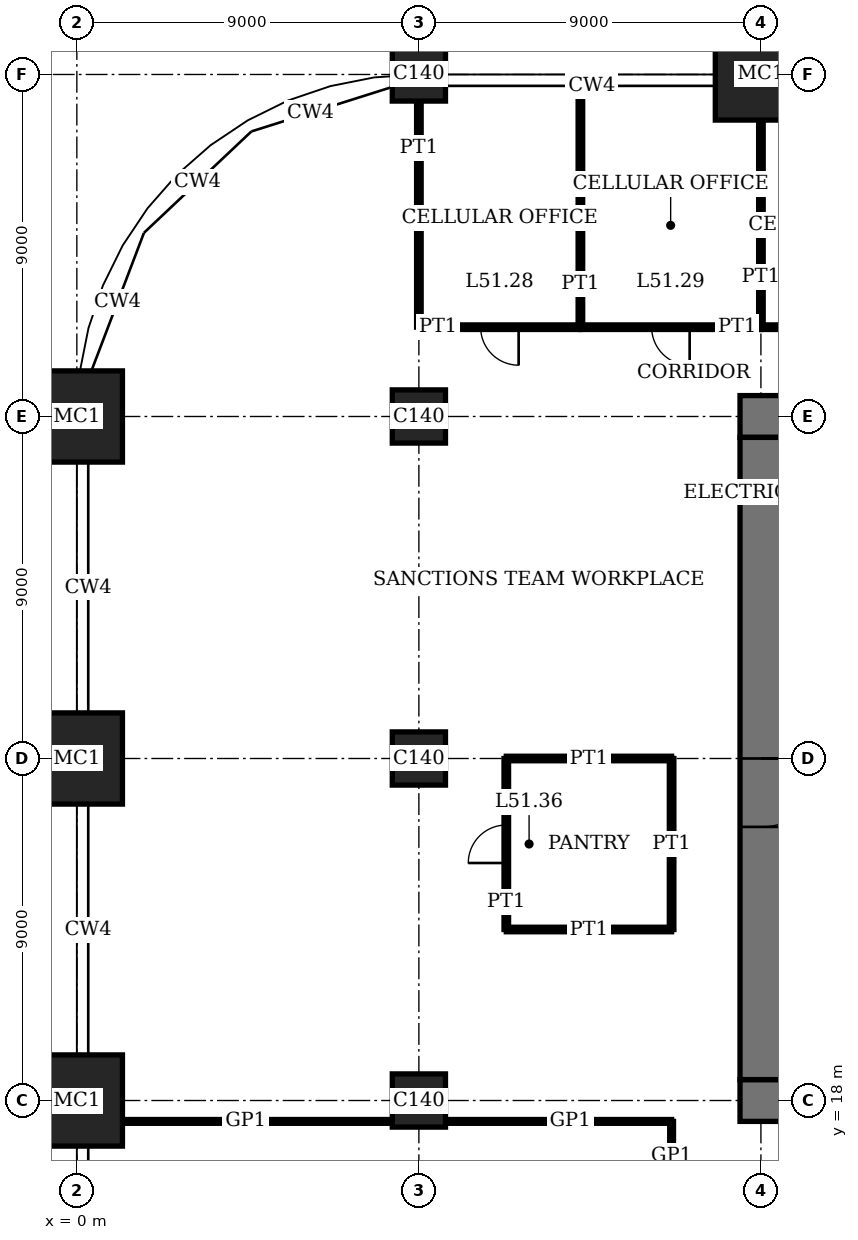
"""IFC4 building model, lengths in metres.
Left out: names, types, materials, properties, quantities, classifications, styles, units other than length and angle.
Written with IfcOpenShell. Run it as: python <this file> out.ifc"""

import sys

from ifc_helpers import new_model, si_unit, direction, frame, frame_2d, origin, origin_2d, place, context, subcontext, project, spatial, rectangle, extrude, element, fill, save


model = new_model("IFC4")
c1 = context("Model", 3, precision=1e-05, world=origin(), true_north=direction((0.0, 1.0)))
c2 = subcontext(c1, "Body", "Model", "MODEL_VIEW")
j1 = project(units=[si_unit("LENGTHUNIT", "METRE"), si_unit("PLANEANGLEUNIT", "RADIAN")], contexts=[c1])
p1 = place(None, origin())
s1 = spatial("IfcSite", under=j1, at=p1, CompositionType="ELEMENT")
p2 = place(p1, origin())
s2 = spatial("IfcBuilding", under=s1, at=p2, CompositionType="ELEMENT")
p3 = place(p2, frame((0.0, 0.0, 210.2)))
s3 = spatial("IfcBuildingStorey", under=s2, at=p3, CompositionType="ELEMENT", Elevation=210.2)
for number, where, z_axis, x_axis in (
    (1, (0.0, 18.0, 0.0), (0.0, 0.0, 1.0), (1.0, 0.0, 0.0)),
    (2, (0.0, 27.0, 0.0), (0.0, 0.0, 1.0), (1.0, 0.0, 0.0)),
    (3, (0.0, 36.0, 0.0), (0.0, 0.0, 1.0), (1.0, 0.0, 0.0)),
):
    element("IfcColumn", number, at=place(p3, frame(where, z_axis=z_axis, x_axis=x_axis)), inside=s3, PredefinedType="COLUMN", context=c2, shape_type="SweptSolid", body=[
        extrude(rectangle(XDim=2.4, YDim=2.4, at=origin_2d()), origin(), (0.0, 0.0, 1.0), 4.0),
    ])
for number, where, z_axis, x_axis in (
    (4, (9.0, 18.0, 0.0), (0.0, 0.0, 1.0), (1.0, 0.0, 0.0)),
    (5, (9.0, 27.0, 0.0), (0.0, 0.0, 1.0), (1.0, 0.0, 0.0)),
    (6, (9.0, 36.0, 0.0), (0.0, 0.0, 1.0), (1.0, 0.0, 0.0)),
    (7, (9.0, 45.0, 0.0), (0.0, 0.0, 1.0), (1.0, 0.0, 0.0)),
):
    element("IfcColumn", number, at=place(p3, frame(where, z_axis=z_axis, x_axis=x_axis)), inside=s3, PredefinedType="COLUMN", context=c2, shape_type="SweptSolid", body=[
        extrude(rectangle(XDim=1.4, YDim=1.4, at=origin_2d()), origin(), (0.0, 0.0, 1.0), 4.0),
    ])
p4 = place(p3, frame((18.0, 45.0, 0.0), z_axis=(0.0, 0.0, 1.0), x_axis=(1.0, 0.0, 0.0)))
e8 = element("IfcColumn", 8, at=p4, inside=s3, PredefinedType="COLUMN", context=c2, shape_type="SweptSolid", body=[
    extrude(rectangle(XDim=2.4, YDim=2.4, at=origin_2d()), origin(), (0.0, 0.0, 1.0), 4.0),
])
p5 = place(p3, frame((17.45, 18.0, 0.0), z_axis=(0.0, 0.0, 1.0), x_axis=(1.0, 0.0, 0.0)))
e9 = element("IfcWall", 9, at=p5, inside=s3, PredefinedType="SHEAR", context=c2, shape_type="SweptSolid", body=[
    extrude(rectangle(XDim=28.1, YDim=1.1, at=frame_2d((14.05, 0.0))), origin(), (0.0, 0.0, 1.0), 4.0),
])
p6 = place(p5, frame((11.55, 0.0, 0.0)))
e10 = element("IfcOpeningElement", 10, at=p6, cuts=e9, PredefinedType="OPENING", context=c2, shape_type="SweptSolid", body=[
    extrude(rectangle(XDim=1.0, YDim=2.4, at=frame_2d((0.5, 1.2))), frame((0.0, 0.56, 0.0), z_axis=(0.0, -1.0, 0.0), x_axis=(1.0, 0.0, 0.0)), (0.0, 0.0, 1.0), 1.12),
])
p7 = place(p5, frame((16.55, 0.0, 0.0)))
e11 = element("IfcOpeningElement", 11, at=p7, cuts=e9, PredefinedType="OPENING", context=c2, shape_type="SweptSolid", body=[
    extrude(rectangle(XDim=1.0, YDim=2.4, at=frame_2d((0.5, 1.2))), frame((0.0, 0.56, 0.0), z_axis=(0.0, -1.0, 0.0), x_axis=(1.0, 0.0, 0.0)), (0.0, 0.0, 1.0), 1.12),
])
p8 = place(p5, frame((20.0, 0.0, 0.0)))
e12 = element("IfcOpeningElement", 12, at=p8, cuts=e9, PredefinedType="OPENING", context=c2, shape_type="SweptSolid", body=[
    extrude(rectangle(XDim=1.1, YDim=2.4, at=frame_2d((0.55, 1.2))), frame((0.0, 0.56, 0.0), z_axis=(0.0, -1.0, 0.0), x_axis=(1.0, 0.0, 0.0)), (0.0, 0.0, 1.0), 1.12),
])
p9 = place(p5, frame((24.05, 0.0, 0.0)))
e13 = element("IfcOpeningElement", 13, at=p9, cuts=e9, PredefinedType="OPENING", context=c2, shape_type="SweptSolid", body=[
    extrude(rectangle(XDim=1.0, YDim=2.4, at=frame_2d((0.5, 1.2))), frame((0.0, 0.56, 0.0), z_axis=(0.0, -1.0, 0.0), x_axis=(1.0, 0.0, 0.0)), (0.0, 0.0, 1.0), 1.12),
])
p10 = place(p3, frame((45.55, 36.0, 0.0), z_axis=(0.0, 0.0, 1.0), x_axis=(-1.0, 0.0, 0.0)))
e14 = element("IfcWall", 14, at=p10, inside=s3, PredefinedType="SHEAR", context=c2, shape_type="SweptSolid", body=[
    extrude(rectangle(XDim=28.1, YDim=1.1, at=frame_2d((14.05, 0.0))), origin(), (0.0, 0.0, 1.0), 4.0),
])
p11 = place(p10, frame((11.55, 0.0, 0.0)))
e15 = element("IfcOpeningElement", 15, at=p11, cuts=e14, PredefinedType="OPENING", context=c2, shape_type="SweptSolid", body=[
    extrude(rectangle(XDim=1.0, YDim=2.4, at=frame_2d((0.5, 1.2))), frame((0.0, 0.56, 0.0), z_axis=(0.0, -1.0, 0.0), x_axis=(1.0, 0.0, 0.0)), (0.0, 0.0, 1.0), 1.12),
])
p12 = place(p10, frame((16.55, 0.0, 0.0)))
e16 = element("IfcOpeningElement", 16, at=p12, cuts=e14, PredefinedType="OPENING", context=c2, shape_type="SweptSolid", body=[
    extrude(rectangle(XDim=1.0, YDim=2.4, at=frame_2d((0.5, 1.2))), frame((0.0, 0.56, 0.0), z_axis=(0.0, -1.0, 0.0), x_axis=(1.0, 0.0, 0.0)), (0.0, 0.0, 1.0), 1.12),
])
p13 = place(p10, frame((20.0, 0.0, 0.0)))
e17 = element("IfcOpeningElement", 17, at=p13, cuts=e14, PredefinedType="OPENING", context=c2, shape_type="SweptSolid", body=[
    extrude(rectangle(XDim=1.1, YDim=2.4, at=frame_2d((0.55, 1.2))), frame((0.0, 0.56, 0.0), z_axis=(0.0, -1.0, 0.0), x_axis=(1.0, 0.0, 0.0)), (0.0, 0.0, 1.0), 1.12),
])
p14 = place(p10, frame((24.05, 0.0, 0.0)))
e18 = element("IfcOpeningElement", 18, at=p14, cuts=e14, PredefinedType="OPENING", context=c2, shape_type="SweptSolid", body=[
    extrude(rectangle(XDim=1.0, YDim=2.4, at=frame_2d((0.5, 1.2))), frame((0.0, 0.56, 0.0), z_axis=(0.0, -1.0, 0.0), x_axis=(1.0, 0.0, 0.0)), (0.0, 0.0, 1.0), 1.12),
])
p15 = place(p3, frame((18.0, 35.45, 0.0), z_axis=(0.0, 0.0, 1.0), x_axis=(0.0, -1.0, 0.0)))
e19 = element("IfcWall", 19, at=p15, inside=s3, PredefinedType="SHEAR", context=c2, shape_type="SweptSolid", body=[
    extrude(rectangle(XDim=16.9, YDim=1.1, at=frame_2d((8.45, 0.0))), origin(), (0.0, 0.0, 1.0), 4.0),
])
p16 = place(p15, frame((8.45, 0.0, 0.0)))
e20 = element("IfcOpeningElement", 20, at=p16, cuts=e19, PredefinedType="OPENING", context=c2, shape_type="SweptSolid", body=[
    extrude(rectangle(XDim=1.8, YDim=2.4, at=frame_2d((0.9, 1.2))), frame((0.0, 0.56, 0.0), z_axis=(0.0, -1.0, 0.0), x_axis=(1.0, 0.0, 0.0)), (0.0, 0.0, 1.0), 1.12),
])
p17 = place(p3, frame((1.2, 17.45, 0.0), z_axis=(0.0, 0.0, 1.0), x_axis=(1.0, 0.0, 0.0)))
e21 = element("IfcWall", 21, at=p17, inside=s3, PredefinedType="PARTITIONING", context=c2, shape_type="SweptSolid", body=[
    extrude(rectangle(XDim=7.1, YDim=0.1, at=frame_2d((3.55, 0.0))), origin(), (0.0, 0.0, 1.0), 3.75),
])
p18 = place(p3, frame((9.7, 17.45, 0.0), z_axis=(0.0, 0.0, 1.0), x_axis=(1.0, 0.0, 0.0)))
e22 = element("IfcWall", 22, at=p18, inside=s3, PredefinedType="PARTITIONING", context=c2, shape_type="SweptSolid", body=[
    extrude(rectangle(XDim=5.95, YDim=0.1, at=frame_2d((2.975, 0.0))), origin(), (0.0, 0.0, 1.0), 3.75),
])
p19 = place(p3, frame((11.3, 22.5, 0.0), z_axis=(0.0, 0.0, 1.0), x_axis=(1.0, 0.0, 0.0)))
e23 = element("IfcWall", 23, at=p19, inside=s3, PredefinedType="PARTITIONING", context=c2, shape_type="SweptSolid", body=[
    extrude(rectangle(XDim=4.35, YDim=0.12, at=frame_2d((2.175, 0.0))), origin(), (0.0, 0.0, 1.0), 3.1),
])
p20 = place(p3, frame((11.3, 27.0, 0.0), z_axis=(0.0, 0.0, 1.0), x_axis=(1.0, 0.0, 0.0)))
e24 = element("IfcWall", 24, at=p20, inside=s3, PredefinedType="PARTITIONING", context=c2, shape_type="SweptSolid", body=[
    extrude(rectangle(XDim=4.35, YDim=0.12, at=frame_2d((2.175, 0.0))), origin(), (0.0, 0.0, 1.0), 3.05),
])
p21 = place(p3, frame((9.0, 38.35, 0.0), z_axis=(0.0, 0.0, 1.0), x_axis=(1.0, 0.0, 0.0)))
e25 = element("IfcWall", 25, at=p21, inside=s3, PredefinedType="PARTITIONING", context=c2, shape_type="SweptSolid", body=[
    extrude(rectangle(XDim=4.25, YDim=0.12, at=frame_2d((2.125, 0.0))), origin(), (0.0, 0.0, 1.0), 3.75),
])
p22 = place(p21, frame((1.625, 0.0, 0.0)))
e26 = element("IfcOpeningElement", 26, at=p22, cuts=e25, PredefinedType="OPENING", context=c2, shape_type="SweptSolid", body=[
    extrude(rectangle(XDim=1.0, YDim=2.4, at=frame_2d((0.5, 1.2))), frame((0.0, 0.07, 0.0), z_axis=(0.0, -1.0, 0.0), x_axis=(1.0, 0.0, 0.0)), (0.0, 0.0, 1.0), 0.14),
])
p23 = place(p3, frame((13.25, 38.35, 0.0), z_axis=(0.0, 0.0, 1.0), x_axis=(1.0, 0.0, 0.0)))
e27 = element("IfcWall", 27, at=p23, inside=s3, PredefinedType="PARTITIONING", context=c2, shape_type="SweptSolid", body=[
    extrude(rectangle(XDim=4.75, YDim=0.12, at=frame_2d((2.375, 0.0))), origin(), (0.0, 0.0, 1.0), 3.75),
])
p24 = place(p23, frame((1.875, 0.0, 0.0)))
e28 = element("IfcOpeningElement", 28, at=p24, cuts=e27, PredefinedType="OPENING", context=c2, shape_type="SweptSolid", body=[
    extrude(rectangle(XDim=1.0, YDim=2.4, at=frame_2d((0.5, 1.2))), frame((0.0, 0.07, 0.0), z_axis=(0.0, -1.0, 0.0), x_axis=(1.0, 0.0, 0.0)), (0.0, 0.0, 1.0), 0.14),
])
p25 = place(p3, frame((18.0, 38.35, 0.0), z_axis=(0.0, 0.0, 1.0), x_axis=(1.0, 0.0, 0.0)))
e29 = element("IfcWall", 29, at=p25, inside=s3, PredefinedType="PARTITIONING", context=c2, shape_type="SweptSolid", body=[
    extrude(rectangle(XDim=4.5, YDim=0.12, at=frame_2d((2.25, 0.0))), origin(), (0.0, 0.0, 1.0), 3.75),
])
p26 = place(p25, frame((1.75, 0.0, 0.0)))
e30 = element("IfcOpeningElement", 30, at=p26, cuts=e29, PredefinedType="OPENING", context=c2, shape_type="SweptSolid", body=[
    extrude(rectangle(XDim=1.0, YDim=2.4, at=frame_2d((0.5, 1.2))), frame((0.0, 0.07, 0.0), z_axis=(0.0, -1.0, 0.0), x_axis=(1.0, 0.0, 0.0)), (0.0, 0.0, 1.0), 0.14),
])
p27 = place(p3, frame((9.0, 38.35, 0.0), z_axis=(0.0, 0.0, 1.0), x_axis=(0.0, 1.0, 0.0)))
e31 = element("IfcWall", 31, at=p27, inside=s3, PredefinedType="PARTITIONING", context=c2, shape_type="SweptSolid", body=[
    extrude(rectangle(XDim=5.95, YDim=0.12, at=frame_2d((2.975, 0.0))), origin(), (0.0, 0.0, 1.0), 3.05),
])
p28 = place(p3, frame((11.3, 22.5, 0.0), z_axis=(0.0, 0.0, 1.0), x_axis=(0.0, 1.0, 0.0)))
e32 = element("IfcWall", 32, at=p28, inside=s3, PredefinedType="PARTITIONING", context=c2, shape_type="SweptSolid", body=[
    extrude(rectangle(XDim=4.5, YDim=0.12, at=frame_2d((2.25, 0.0))), origin(), (0.0, 0.0, 1.0), 3.75),
])
p29 = place(p28, frame((1.75, 0.0, 0.0)))
e33 = element("IfcOpeningElement", 33, at=p29, cuts=e32, PredefinedType="OPENING", context=c2, shape_type="SweptSolid", body=[
    extrude(rectangle(XDim=1.0, YDim=2.4, at=frame_2d((0.5, 1.2))), frame((0.0, 0.07, 0.0), z_axis=(0.0, -1.0, 0.0), x_axis=(1.0, 0.0, 0.0)), (0.0, 0.0, 1.0), 0.14),
])
p30 = place(p3, frame((13.25, 38.35, 0.0), z_axis=(0.0, 0.0, 1.0), x_axis=(0.0, 1.0, 0.0)))
e34 = element("IfcWall", 34, at=p30, inside=s3, PredefinedType="PARTITIONING", context=c2, shape_type="SweptSolid", body=[
    extrude(rectangle(XDim=6.34, YDim=0.12, at=frame_2d((3.17, 0.0))), origin(), (0.0, 0.0, 1.0), 3.75),
])
p31 = place(p3, frame((15.65, 22.5, 0.0), z_axis=(0.0, 0.0, 1.0), x_axis=(0.0, 1.0, 0.0)))
e35 = element("IfcWall", 35, at=p31, inside=s3, PredefinedType="PARTITIONING", context=c2, shape_type="SweptSolid", body=[
    extrude(rectangle(XDim=4.5, YDim=0.12, at=frame_2d((2.25, 0.0))), origin(), (0.0, 0.0, 1.0), 3.75),
])
p32 = place(p3, frame((15.65, 15.65, 0.0), z_axis=(0.0, 0.0, 1.0), x_axis=(0.0, 1.0, 0.0)))
e36 = element("IfcWall", 36, at=p32, inside=s3, PredefinedType="PARTITIONING", context=c2, shape_type="SweptSolid", body=[
    extrude(rectangle(XDim=1.8, YDim=0.1, at=frame_2d((0.9, 0.0))), origin(), (0.0, 0.0, 1.0), 3.75),
])
p33 = place(p3, frame((18.0, 38.35, 0.0), z_axis=(0.0, 0.0, 1.0), x_axis=(0.0, 1.0, 0.0)))
e37 = element("IfcWall", 37, at=p33, inside=s3, PredefinedType="PARTITIONING", context=c2, shape_type="SweptSolid", body=[
    extrude(rectangle(XDim=5.45, YDim=0.12, at=frame_2d((2.725, 0.0))), origin(), (0.0, 0.0, 1.0), 3.05),
])
p34 = place(p16, origin())
e38 = element("IfcDoor", 38, at=p34, inside=s3, OperationType="DOUBLE_DOOR_DOUBLE_SWING", PredefinedType="DOOR", context=c2, shape_type="SweptSolid", body=[
    extrude(rectangle(XDim=1.8, YDim=2.4, at=frame_2d((0.9, 1.2))), frame((0.0, 0.03, 0.0), z_axis=(0.0, -1.0, 0.0), x_axis=(1.0, 0.0, 0.0)), (0.0, 0.0, 1.0), 0.06),
    extrude(rectangle(XDim=0.04, YDim=2.4, at=frame_2d((0.02, 1.2))), frame((0.0, 0.55, 0.0), z_axis=(0.0, -1.0, 0.0), x_axis=(1.0, 0.0, 0.0)), (0.0, 0.0, 1.0), 1.1),
    extrude(rectangle(XDim=0.04, YDim=2.4, at=frame_2d((1.78, 1.2))), frame((0.0, 0.55, 0.0), z_axis=(0.0, -1.0, 0.0), x_axis=(1.0, 0.0, 0.0)), (0.0, 0.0, 1.0), 1.1),
    extrude(rectangle(XDim=1.8, YDim=0.04, at=frame_2d((0.9, 2.38))), frame((0.0, 0.55, 0.0), z_axis=(0.0, -1.0, 0.0), x_axis=(1.0, 0.0, 0.0)), (0.0, 0.0, 1.0), 1.1),
])
fill(e20, e38)
p35 = place(p22, origin())
e39 = element("IfcDoor", 39, at=p35, inside=s3, OperationType="SINGLE_SWING_RIGHT", PredefinedType="DOOR", context=c2, shape_type="SweptSolid", body=[
    extrude(rectangle(XDim=1.0, YDim=2.4, at=frame_2d((0.5, 1.2))), frame((0.0, 0.025, 0.0), z_axis=(0.0, -1.0, 0.0), x_axis=(1.0, 0.0, 0.0)), (0.0, 0.0, 1.0), 0.05),
])
fill(e26, e39)
p36 = place(p24, origin())
e40 = element("IfcDoor", 40, at=p36, inside=s3, OperationType="SINGLE_SWING_RIGHT", PredefinedType="DOOR", context=c2, shape_type="SweptSolid", body=[
    extrude(rectangle(XDim=1.0, YDim=2.4, at=frame_2d((0.5, 1.2))), frame((0.0, 0.025, 0.0), z_axis=(0.0, -1.0, 0.0), x_axis=(1.0, 0.0, 0.0)), (0.0, 0.0, 1.0), 0.05),
])
fill(e28, e40)
p37 = place(p29, origin())
e41 = element("IfcDoor", 41, at=p37, inside=s3, OperationType="SINGLE_SWING_RIGHT", PredefinedType="DOOR", context=c2, shape_type="SweptSolid", body=[
    extrude(rectangle(XDim=1.0, YDim=2.4, at=frame_2d((0.5, 1.2))), frame((0.0, 0.025, 0.0), z_axis=(0.0, -1.0, 0.0), x_axis=(1.0, 0.0, 0.0)), (0.0, 0.0, 1.0), 0.05),
])
fill(e33, e41)
save(model, sys.argv[1])
